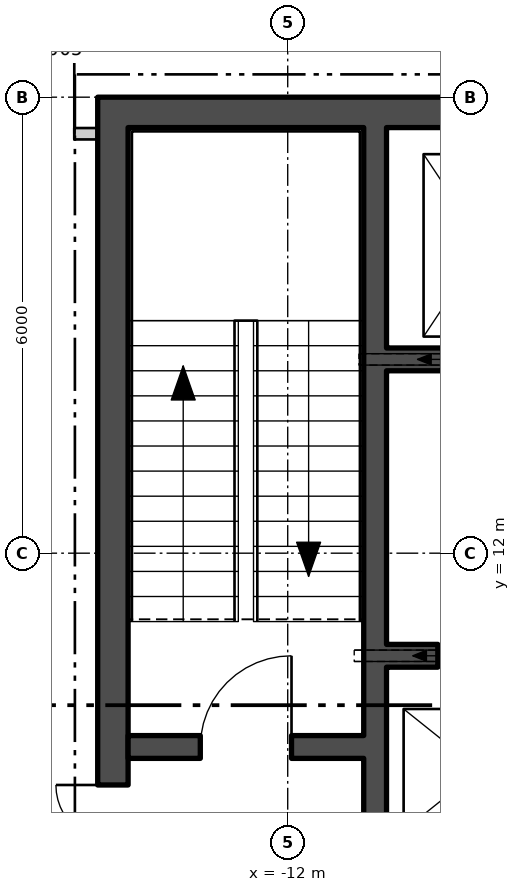
"""IFC4 building model, lengths in metres.
Left out: names, types, materials, properties, quantities, classifications, styles, units other than length and angle.
Written with IfcOpenShell. Run it as: python <this file> out.ifc"""

import sys

from ifc_helpers import new_model, si_unit, direction, frame, frame_2d, origin, place, context, subcontext, project, spatial, polyline, rectangle, outline, extrude, element, fill, save


model = new_model("IFC4")
c1 = context("Model", 3, precision=1e-05, world=origin(), true_north=direction((0.0, 1.0)))
c2 = subcontext(c1, "Body", "Model", "MODEL_VIEW")
j1 = project(units=[si_unit("LENGTHUNIT", "METRE"), si_unit("PLANEANGLEUNIT", "RADIAN")], contexts=[c1])
p1 = place(None, origin())
s1 = spatial("IfcSite", under=j1, at=p1, CompositionType="ELEMENT")
p2 = place(p1, origin())
s2 = spatial("IfcBuilding", under=s1, at=p2, CompositionType="ELEMENT")
p3 = place(p2, frame((0.0, 0.0, 245.4)))
s3 = spatial("IfcBuildingStorey", under=s2, at=p3, CompositionType="ELEMENT", Elevation=245.4)
p4 = place(p3, frame((-25.85, 14.822, -0.18), z_axis=(0.0, 0.0, 1.0), x_axis=(0.500000335318, -0.866025210188, 0.0)))
e1 = element("IfcWall", 1, at=p4, inside=s3, PredefinedType="SOLIDWALL", context=c2, shape_type="SweptSolid", body=[
    extrude(outline(polyline([(-0.13, -0.225), (45.88, -0.225), (45.62, 0.225), (0.13, 0.225), (-0.13, -0.225)])), origin(), (0.0, 0.0, 1.0), 3.68),
])
p5 = place(p4, frame((1.425, 0.0, 1.08)))
e2 = element("IfcOpeningElement", 2, at=p5, cuts=e1, PredefinedType="OPENING", context=c2, shape_type="SweptSolid", body=[
    extrude(rectangle(XDim=2.4, YDim=2.0, at=frame_2d((1.2, 1.0))), frame((0.0, 0.235, 0.0), z_axis=(0.0, -1.0, 0.0), x_axis=(1.0, 0.0, 0.0)), (0.0, 0.0, 1.0), 0.47),
])
p6 = place(p4, frame((10.403, 0.0, 1.08)))
e3 = element("IfcOpeningElement", 3, at=p6, cuts=e1, PredefinedType="OPENING", context=c2, shape_type="SweptSolid", body=[
    extrude(rectangle(XDim=2.4, YDim=2.0, at=frame_2d((1.2, 1.0))), frame((0.0, 0.235, 0.0), z_axis=(0.0, -1.0, 0.0), x_axis=(1.0, 0.0, 0.0)), (0.0, 0.0, 1.0), 0.47),
])
p7 = place(p4, frame((14.912, 0.0, 1.08)))
e4 = element("IfcOpeningElement", 4, at=p7, cuts=e1, PredefinedType="OPENING", context=c2, shape_type="SweptSolid", body=[
    extrude(rectangle(XDim=2.4, YDim=2.0, at=frame_2d((1.2, 1.0))), frame((0.0, 0.235, 0.0), z_axis=(0.0, -1.0, 0.0), x_axis=(1.0, 0.0, 0.0)), (0.0, 0.0, 1.0), 0.47),
])
p8 = place(p4, frame((19.421, 0.0, 1.08)))
e5 = element("IfcOpeningElement", 5, at=p8, cuts=e1, PredefinedType="OPENING", context=c2, shape_type="SweptSolid", body=[
    extrude(rectangle(XDim=2.4, YDim=2.0, at=frame_2d((1.2, 1.0))), frame((0.0, 0.235, 0.0), z_axis=(0.0, -1.0, 0.0), x_axis=(1.0, 0.0, 0.0)), (0.0, 0.0, 1.0), 0.47),
])
p9 = place(p4, frame((23.929, 0.0, 1.08)))
e6 = element("IfcOpeningElement", 6, at=p9, cuts=e1, PredefinedType="OPENING", context=c2, shape_type="SweptSolid", body=[
    extrude(rectangle(XDim=2.4, YDim=2.0, at=frame_2d((1.2, 1.0))), frame((0.0, 0.235, 0.0), z_axis=(0.0, -1.0, 0.0), x_axis=(1.0, 0.0, 0.0)), (0.0, 0.0, 1.0), 0.47),
])
p10 = place(p4, frame((28.438, 0.0, 1.08)))
e7 = element("IfcOpeningElement", 7, at=p10, cuts=e1, PredefinedType="OPENING", context=c2, shape_type="SweptSolid", body=[
    extrude(rectangle(XDim=2.4, YDim=2.0, at=frame_2d((1.2, 1.0))), frame((0.0, 0.235, 0.0), z_axis=(0.0, -1.0, 0.0), x_axis=(1.0, 0.0, 0.0)), (0.0, 0.0, 1.0), 0.47),
])
p11 = place(p4, frame((32.947, 0.0, 1.08)))
e8 = element("IfcOpeningElement", 8, at=p11, cuts=e1, PredefinedType="OPENING", context=c2, shape_type="SweptSolid", body=[
    extrude(rectangle(XDim=2.4, YDim=2.0, at=frame_2d((1.2, 1.0))), frame((0.0, 0.235, 0.0), z_axis=(0.0, -1.0, 0.0), x_axis=(1.0, 0.0, 0.0)), (0.0, 0.0, 1.0), 0.47),
])
p12 = place(p4, frame((37.455, 0.0, 1.08)))
e9 = element("IfcOpeningElement", 9, at=p12, cuts=e1, PredefinedType="OPENING", context=c2, shape_type="SweptSolid", body=[
    extrude(rectangle(XDim=2.4, YDim=2.0, at=frame_2d((1.2, 1.0))), frame((0.0, 0.235, 0.0), z_axis=(0.0, -1.0, 0.0), x_axis=(1.0, 0.0, 0.0)), (0.0, 0.0, 1.0), 0.47),
])
p13 = place(p4, frame((41.925, 0.0, 1.08)))
e10 = element("IfcOpeningElement", 10, at=p13, cuts=e1, PredefinedType="OPENING", context=c2, shape_type="SweptSolid", body=[
    extrude(rectangle(XDim=2.4, YDim=2.0, at=frame_2d((1.2, 1.0))), frame((0.0, 0.235, 0.0), z_axis=(0.0, -1.0, 0.0), x_axis=(1.0, 0.0, 0.0)), (0.0, 0.0, 1.0), 0.47),
])
p14 = place(p3, frame((-14.5, 17.8, 0.0), z_axis=(0.0, 0.0, 1.0), x_axis=(1.0, 0.0, 0.0)))
e11 = element("IfcWall", 11, at=p14, inside=s3, PredefinedType="SHEAR", context=c2, shape_type="SweptSolid", body=[
    extrude(rectangle(XDim=29.0, YDim=0.4, at=frame_2d((14.5, 0.0))), origin(), (0.0, 0.0, 1.0), 3.7),
])
p15 = place(p3, frame((-14.3, 4.4, 0.0), z_axis=(0.0, 0.0, 1.0), x_axis=(0.0, 1.0, 0.0)))
e12 = element("IfcWall", 12, at=p15, inside=s3, PredefinedType="SHEAR", context=c2, shape_type="SweptSolid", body=[
    extrude(rectangle(XDim=13.2, YDim=0.4, at=frame_2d((6.6, 0.0))), origin(), (0.0, 0.0, 1.0), 3.7),
])
p16 = place(p15, frame((3.05, 0.0, 0.0)))
e13 = element("IfcOpeningElement", 13, at=p16, cuts=e12, PredefinedType="OPENING", context=c2, shape_type="SweptSolid", body=[
    extrude(rectangle(XDim=1.5, YDim=2.1, at=frame_2d((0.75, 1.05))), frame((0.0, 0.21, 0.0), z_axis=(0.0, -1.0, 0.0), x_axis=(1.0, 0.0, 0.0)), (0.0, 0.0, 1.0), 0.42),
])
p17 = place(p3, frame((-10.85, 4.4, 0.0), z_axis=(0.0, 0.0, 1.0), x_axis=(0.0, 1.0, 0.0)))
e14 = element("IfcWall", 14, at=p17, inside=s3, PredefinedType="SHEAR", context=c2, shape_type="SweptSolid", body=[
    extrude(rectangle(XDim=13.2, YDim=0.3, at=frame_2d((6.6, 0.0))), origin(), (0.0, 0.0, 1.0), 3.7),
])
p18 = place(p17, frame((1.575, 0.0, 0.0)))
e15 = element("IfcOpeningElement", 15, at=p18, cuts=e14, PredefinedType="OPENING", context=c2, shape_type="SweptSolid", body=[
    extrude(rectangle(XDim=1.25, YDim=2.1, at=frame_2d((0.625, 1.05))), frame((0.0, 0.16, 0.0), z_axis=(0.0, -1.0, 0.0), x_axis=(1.0, 0.0, 0.0)), (0.0, 0.0, 1.0), 0.32),
])
p19 = place(p17, frame((0.4, 0.0, 0.0)))
e16 = element("IfcOpeningElement", 16, at=p19, cuts=e14, PredefinedType="OPENING", context=c2, shape_type="SweptSolid", body=[
    extrude(rectangle(XDim=0.9, YDim=2.1, at=frame_2d((0.45, 1.05))), frame((0.0, 0.16, 0.0), z_axis=(0.0, -1.0, 0.0), x_axis=(1.0, 0.0, 0.0)), (0.0, 0.0, 1.0), 0.32),
])
p20 = place(p3, frame((-14.1, 9.45, 0.0), z_axis=(0.0, 0.0, 1.0), x_axis=(1.0, 0.0, 0.0)))
e17 = element("IfcWall", 17, at=p20, inside=s3, PredefinedType="SHEAR", context=c2, shape_type="SweptSolid", body=[
    extrude(rectangle(XDim=3.1, YDim=0.3, at=frame_2d((1.55, 0.0))), origin(), (0.0, 0.0, 1.0), 3.7),
])
p21 = place(p20, frame((0.95, 0.0, 0.0)))
e18 = element("IfcOpeningElement", 18, at=p21, cuts=e17, PredefinedType="OPENING", context=c2, shape_type="SweptSolid", body=[
    extrude(rectangle(XDim=1.2, YDim=2.1, at=frame_2d((0.6, 1.05))), frame((0.0, 0.16, 0.0), z_axis=(0.0, -1.0, 0.0), x_axis=(1.0, 0.0, 0.0)), (0.0, 0.0, 1.0), 0.32),
])
p22 = place(p3, frame((-10.7, 14.55, 0.0), z_axis=(0.0, 0.0, 1.0), x_axis=(1.0, 0.0, 0.0)))
e19 = element("IfcWall", 19, at=p22, inside=s3, PredefinedType="SHEAR", context=c2, shape_type="SweptSolid", body=[
    extrude(rectangle(XDim=21.4, YDim=0.3, at=frame_2d((10.7, 0.0))), origin(), (0.0, 0.0, 1.0), 3.7),
])
p23 = place(p22, frame((0.738, 0.0, 0.0)))
e20 = element("IfcOpeningElement", 20, at=p23, cuts=e19, PredefinedType="OPENING", context=c2, shape_type="SweptSolid", body=[
    extrude(rectangle(XDim=1.1, YDim=2.1, at=frame_2d((0.55, 1.05))), frame((0.0, 0.16, 0.0), z_axis=(0.0, -1.0, 0.0), x_axis=(1.0, 0.0, 0.0)), (0.0, 0.0, 1.0), 0.32),
])
p24 = place(p22, frame((3.462, 0.0, 0.0)))
e21 = element("IfcOpeningElement", 21, at=p24, cuts=e19, PredefinedType="OPENING", context=c2, shape_type="SweptSolid", body=[
    extrude(rectangle(XDim=1.1, YDim=2.1, at=frame_2d((0.55, 1.05))), frame((0.0, 0.16, 0.0), z_axis=(0.0, -1.0, 0.0), x_axis=(1.0, 0.0, 0.0)), (0.0, 0.0, 1.0), 0.32),
])
p25 = place(p22, frame((6.138, 0.0, 0.0)))
e22 = element("IfcOpeningElement", 22, at=p25, cuts=e19, PredefinedType="OPENING", context=c2, shape_type="SweptSolid", body=[
    extrude(rectangle(XDim=1.1, YDim=2.1, at=frame_2d((0.55, 1.05))), frame((0.0, 0.16, 0.0), z_axis=(0.0, -1.0, 0.0), x_axis=(1.0, 0.0, 0.0)), (0.0, 0.0, 1.0), 0.32),
])
p26 = place(p22, frame((8.812, 0.0, 0.0)))
e23 = element("IfcOpeningElement", 23, at=p26, cuts=e19, PredefinedType="OPENING", context=c2, shape_type="SweptSolid", body=[
    extrude(rectangle(XDim=1.1, YDim=2.1, at=frame_2d((0.55, 1.05))), frame((0.0, 0.16, 0.0), z_axis=(0.0, -1.0, 0.0), x_axis=(1.0, 0.0, 0.0)), (0.0, 0.0, 1.0), 0.32),
])
p27 = place(p22, frame((19.562, 0.0, 0.0)))
e24 = element("IfcOpeningElement", 24, at=p27, cuts=e19, PredefinedType="OPENING", context=c2, shape_type="SweptSolid", body=[
    extrude(rectangle(XDim=1.1, YDim=2.1, at=frame_2d((0.55, 1.05))), frame((0.0, 0.16, 0.0), z_axis=(0.0, -1.0, 0.0), x_axis=(1.0, 0.0, 0.0)), (0.0, 0.0, 1.0), 0.32),
])
p28 = place(p22, frame((12.875, 0.0, 0.0)))
e25 = element("IfcOpeningElement", 25, at=p28, cuts=e19, PredefinedType="OPENING", context=c2, shape_type="SweptSolid", body=[
    extrude(rectangle(XDim=1.0, YDim=2.1, at=frame_2d((0.5, 1.05))), frame((0.0, 0.16, 0.0), z_axis=(0.0, -1.0, 0.0), x_axis=(1.0, 0.0, 0.0)), (0.0, 0.0, 1.0), 0.32),
])
p29 = place(p22, frame((16.887, 0.0, 0.0)))
e26 = element("IfcOpeningElement", 26, at=p29, cuts=e19, PredefinedType="OPENING", context=c2, shape_type="SweptSolid", body=[
    extrude(rectangle(XDim=1.0, YDim=2.1, at=frame_2d((0.5, 1.05))), frame((0.0, 0.16, 0.0), z_axis=(0.0, -1.0, 0.0), x_axis=(1.0, 0.0, 0.0)), (0.0, 0.0, 1.0), 0.32),
])
p30 = place(p3, frame((-10.7, 10.65, 0.0), z_axis=(0.0, 0.0, 1.0), x_axis=(1.0, 0.0, 0.0)))
e27 = element("IfcWall", 27, at=p30, inside=s3, PredefinedType="SHEAR", context=c2, shape_type="SweptSolid", body=[
    extrude(rectangle(XDim=10.3, YDim=0.3, at=frame_2d((5.15, 0.0))), origin(), (0.0, 0.0, 1.0), 3.7),
])
p31 = place(p30, frame((0.675, 0.0, 0.0)))
e28 = element("IfcOpeningElement", 28, at=p31, cuts=e27, PredefinedType="OPENING", context=c2, shape_type="SweptSolid", body=[
    extrude(rectangle(XDim=1.1, YDim=2.1, at=frame_2d((0.55, 1.05))), frame((0.0, 0.16, 0.0), z_axis=(0.0, -1.0, 0.0), x_axis=(1.0, 0.0, 0.0)), (0.0, 0.0, 1.0), 0.32),
])
p32 = place(p30, frame((3.275, 0.0, 0.0)))
e29 = element("IfcOpeningElement", 29, at=p32, cuts=e27, PredefinedType="OPENING", context=c2, shape_type="SweptSolid", body=[
    extrude(rectangle(XDim=1.1, YDim=2.1, at=frame_2d((0.55, 1.05))), frame((0.0, 0.16, 0.0), z_axis=(0.0, -1.0, 0.0), x_axis=(1.0, 0.0, 0.0)), (0.0, 0.0, 1.0), 0.32),
])
p33 = place(p30, frame((5.825, 0.0, 0.0)))
e30 = element("IfcOpeningElement", 30, at=p33, cuts=e27, PredefinedType="OPENING", context=c2, shape_type="SweptSolid", body=[
    extrude(rectangle(XDim=1.1, YDim=2.1, at=frame_2d((0.55, 1.05))), frame((0.0, 0.16, 0.0), z_axis=(0.0, -1.0, 0.0), x_axis=(1.0, 0.0, 0.0)), (0.0, 0.0, 1.0), 0.32),
])
p34 = place(p30, frame((8.425, 0.0, 0.0)))
e31 = element("IfcOpeningElement", 31, at=p34, cuts=e27, PredefinedType="OPENING", context=c2, shape_type="SweptSolid", body=[
    extrude(rectangle(XDim=1.0, YDim=2.1, at=frame_2d((0.5, 1.05))), frame((0.0, 0.16, 0.0), z_axis=(0.0, -1.0, 0.0), x_axis=(1.0, 0.0, 0.0)), (0.0, 0.0, 1.0), 0.32),
])
p35 = place(p3, frame((-16.225, 17.519, 0.0), z_axis=(0.0, 0.0, 1.0), x_axis=(1.0, 0.0, 0.0)))
e32 = element("IfcWall", 32, at=p35, inside=s3, PredefinedType="PARTITIONING", context=c2, shape_type="SweptSolid", body=[
    extrude(rectangle(XDim=1.725, YDim=0.15, at=frame_2d((0.863, 0.0))), origin(), (0.0, 0.0, 1.0), 3.7),
])
p36 = place(p35, frame((0.417, 0.0, 0.0)))
e33 = element("IfcOpeningElement", 33, at=p36, cuts=e32, PredefinedType="OPENING", context=c2, shape_type="SweptSolid", body=[
    extrude(rectangle(XDim=1.0, YDim=2.1, at=frame_2d((0.5, 1.05))), frame((0.0, 0.085, 0.0), z_axis=(0.0, -1.0, 0.0), x_axis=(1.0, 0.0, 0.0)), (0.0, 0.0, 1.0), 0.17),
])
p37 = place(p31, origin())
e34 = element("IfcDoor", 34, at=p37, inside=s3, OperationType="SLIDING_TO_LEFT", PredefinedType="DOOR", context=c2, shape_type="SweptSolid", body=[
    extrude(rectangle(XDim=1.1, YDim=2.1, at=frame_2d((0.55, 1.05))), frame((0.0, 0.025, 0.0), z_axis=(0.0, -1.0, 0.0), x_axis=(1.0, 0.0, 0.0)), (0.0, 0.0, 1.0), 0.05),
])
fill(e28, e34)
p38 = place(p21, origin())
e35 = element("IfcDoor", 35, at=p38, inside=s3, OperationType="SINGLE_SWING_LEFT", PredefinedType="DOOR", context=c2, shape_type="SweptSolid", body=[
    extrude(rectangle(XDim=1.2, YDim=2.1, at=frame_2d((0.6, 1.05))), frame((0.0, 0.025, 0.0), z_axis=(0.0, -1.0, 0.0), x_axis=(1.0, 0.0, 0.0)), (0.0, 0.0, 1.0), 0.05),
])
fill(e18, e35)
p39 = place(p16, origin())
e36 = element("IfcDoor", 36, at=p39, inside=s3, OperationType="DOUBLE_DOOR_SINGLE_SWING", PredefinedType="DOOR", context=c2, shape_type="SweptSolid", body=[
    extrude(rectangle(XDim=1.5, YDim=2.1, at=frame_2d((0.75, 1.05))), frame((0.0, 0.025, 0.0), z_axis=(0.0, -1.0, 0.0), x_axis=(1.0, 0.0, 0.0)), (0.0, 0.0, 1.0), 0.05),
])
fill(e13, e36)
p40 = place(p36, origin())
e37 = element("IfcDoor", 37, at=p40, inside=s3, OperationType="SINGLE_SWING_LEFT", PredefinedType="DOOR", context=c2, shape_type="SweptSolid", body=[
    extrude(rectangle(XDim=1.0, YDim=2.1, at=frame_2d((0.5, 1.05))), frame((0.0, 0.025, 0.0), z_axis=(0.0, -1.0, 0.0), x_axis=(1.0, 0.0, 0.0)), (0.0, 0.0, 1.0), 0.05),
])
fill(e33, e37)
save(model, sys.argv[1])
